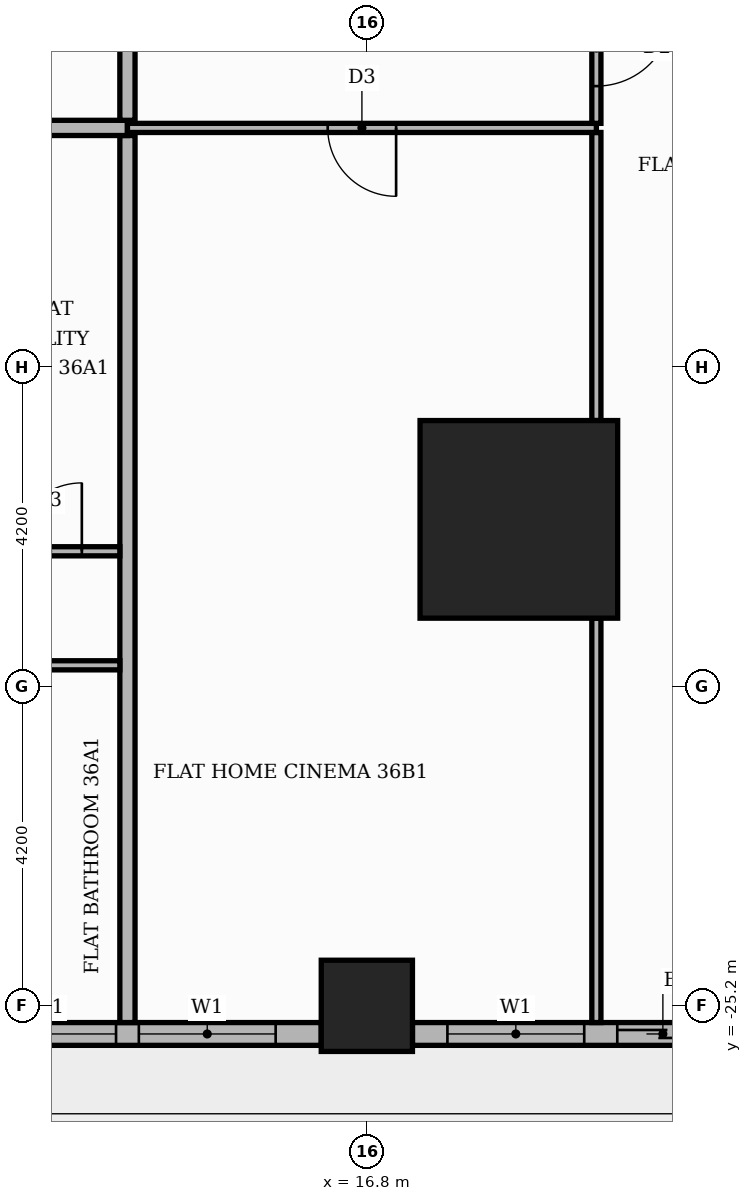
"""IFC4 building model, lengths in metres.
Left out: names, types, materials, properties, quantities, classifications, styles, units other than length and angle.
Written with IfcOpenShell. Run it as: python <this file> out.ifc"""

import sys

from ifc_helpers import new_model, si_unit, direction, frame, frame_2d, origin, origin_2d, place, context, subcontext, project, spatial, rectangle, extrude, element, fill, save


model = new_model("IFC4")
c1 = context("Model", 3, precision=1e-05, world=origin(), true_north=direction((0.0, 1.0)))
c2 = subcontext(c1, "Body", "Model", "MODEL_VIEW")
j1 = project(units=[si_unit("LENGTHUNIT", "METRE"), si_unit("PLANEANGLEUNIT", "RADIAN")], contexts=[c1])
p1 = place(None, origin())
s1 = spatial("IfcSite", under=j1, at=p1, CompositionType="ELEMENT")
p2 = place(p1, origin())
s2 = spatial("IfcBuilding", under=s1, at=p2, CompositionType="ELEMENT")
p3 = place(p2, frame((0.0, 0.0, 153.3)))
s3 = spatial("IfcBuildingStorey", under=s2, at=p3, CompositionType="ELEMENT", Elevation=153.3)
p4 = place(p3, frame((18.8, -18.8, 0.0), z_axis=(0.0, 0.0, 1.0), x_axis=(1.0, 0.0, 0.0)))
e1 = element("IfcColumn", 1, at=p4, inside=s3, PredefinedType="COLUMN", context=c2, shape_type="SweptSolid", body=[
    extrude(rectangle(XDim=2.6, YDim=2.6, at=origin_2d()), origin(), (0.0, 0.0, 1.0), 3.9),
])
p5 = place(p3, frame((16.8, -25.2, 0.0), z_axis=(0.0, 0.0, 1.0), x_axis=(1.0, 0.0, 0.0)))
e2 = element("IfcColumn", 2, at=p5, inside=s3, PredefinedType="COLUMN", context=c2, shape_type="SweptSolid", body=[
    extrude(rectangle(XDim=1.2, YDim=1.2, at=origin_2d()), origin(), (0.0, 0.0, 1.0), 3.9),
])
p6 = place(p3, frame((9.0, -25.57, 0.0), z_axis=(0.0, 0.0, 1.0), x_axis=(1.0, 0.0, 0.0)))
e3 = element("IfcWall", 3, at=p6, inside=s3, PredefinedType="STANDARD", context=c2, shape_type="SweptSolid", body=[
    extrude(rectangle(XDim=7.2, YDim=0.3, at=frame_2d((3.6, 0.0))), origin(), (0.0, 0.0, 1.0), 3.48),
])
p7 = place(p6, frame((0.6, 0.0, 0.9)))
e4 = element("IfcOpeningElement", 4, at=p7, cuts=e3, PredefinedType="OPENING", context=c2, shape_type="SweptSolid", body=[
    extrude(rectangle(XDim=1.8, YDim=2.1, at=frame_2d((0.9, 1.05))), frame((0.0, 0.16, 0.0), z_axis=(0.0, -1.0, 0.0), x_axis=(1.0, 0.0, 0.0)), (0.0, 0.0, 1.0), 0.32),
])
p8 = place(p6, frame((2.7, 0.0, 0.9)))
e5 = element("IfcOpeningElement", 5, at=p8, cuts=e3, PredefinedType="OPENING", context=c2, shape_type="SweptSolid", body=[
    extrude(rectangle(XDim=1.8, YDim=2.1, at=frame_2d((0.9, 1.05))), frame((0.0, 0.16, 0.0), z_axis=(0.0, -1.0, 0.0), x_axis=(1.0, 0.0, 0.0)), (0.0, 0.0, 1.0), 0.32),
])
p9 = place(p6, frame((4.8, 0.0, 0.9)))
e6 = element("IfcOpeningElement", 6, at=p9, cuts=e3, PredefinedType="OPENING", context=c2, shape_type="SweptSolid", body=[
    extrude(rectangle(XDim=1.8, YDim=2.1, at=frame_2d((0.9, 1.05))), frame((0.0, 0.16, 0.0), z_axis=(0.0, -1.0, 0.0), x_axis=(1.0, 0.0, 0.0)), (0.0, 0.0, 1.0), 0.32),
])
p10 = place(p3, frame((17.4, -25.57, 0.0), z_axis=(0.0, 0.0, 1.0), x_axis=(1.0, 0.0, 0.0)))
e7 = element("IfcWall", 7, at=p10, inside=s3, PredefinedType="STANDARD", context=c2, shape_type="SweptSolid", body=[
    extrude(rectangle(XDim=4.32, YDim=0.3, at=frame_2d((2.16, 0.0))), origin(), (0.0, 0.0, 1.0), 3.48),
])
p11 = place(p10, frame((2.695, 0.0, 0.0)))
e8 = element("IfcOpeningElement", 8, at=p11, cuts=e7, PredefinedType="OPENING", context=c2, shape_type="SweptSolid", body=[
    extrude(rectangle(XDim=1.2, YDim=2.4, at=frame_2d((0.6, 1.2))), frame((0.0, 0.16, 0.0), z_axis=(0.0, -1.0, 0.0), x_axis=(1.0, 0.0, 0.0)), (0.0, 0.0, 1.0), 0.32),
])
p12 = place(p10, frame((0.46, 0.0, 0.9)))
e9 = element("IfcOpeningElement", 9, at=p12, cuts=e7, PredefinedType="OPENING", context=c2, shape_type="SweptSolid", body=[
    extrude(rectangle(XDim=1.8, YDim=2.1, at=frame_2d((0.9, 1.05))), frame((0.0, 0.16, 0.0), z_axis=(0.0, -1.0, 0.0), x_axis=(1.0, 0.0, 0.0)), (0.0, 0.0, 1.0), 0.32),
])
p13 = place(p3, frame((13.65, -25.42, 0.0), z_axis=(0.0, 0.0, 1.0), x_axis=(0.0, 1.0, 0.0)))
e10 = element("IfcWall", 10, at=p13, inside=s3, PredefinedType="PARTITIONING", context=c2, shape_type="SweptSolid", body=[
    extrude(rectangle(XDim=11.67, YDim=0.2, at=frame_2d((5.835, 0.0))), origin(), (0.0, 0.0, 1.0), 3.48),
])
p14 = place(p3, frame((19.82, -25.42, 0.0), z_axis=(0.0, 0.0, 1.0), x_axis=(0.0, 1.0, 0.0)))
e11 = element("IfcWall", 11, at=p14, inside=s3, PredefinedType="PARTITIONING", context=c2, shape_type="SweptSolid", body=[
    extrude(rectangle(XDim=5.32, YDim=0.12, at=frame_2d((2.66, 0.0))), origin(), (0.0, 0.0, 1.0), 3.48),
])
p15 = place(p3, frame((-25.42, -20.72, 0.0), z_axis=(0.0, 0.0, 1.0), x_axis=(1.0, 0.0, 0.0)))
e12 = element("IfcWall", 12, at=p15, inside=s3, PredefinedType="PARTITIONING", context=c2, shape_type="SweptSolid", body=[
    extrude(rectangle(XDim=38.97, YDim=0.12, at=frame_2d((19.485, 0.0))), origin(), (0.0, 0.0, 1.0), 3.48),
])
p16 = place(p15, frame((12.32, 0.0, 0.0)))
e13 = element("IfcOpeningElement", 13, at=p16, cuts=e12, PredefinedType="OPENING", context=c2, shape_type="SweptSolid", body=[
    extrude(rectangle(XDim=1.0, YDim=2.1, at=frame_2d((0.5, 1.05))), frame((0.0, 0.07, 0.0), z_axis=(0.0, -1.0, 0.0), x_axis=(1.0, 0.0, 0.0)), (0.0, 0.0, 1.0), 0.14),
])
p17 = place(p15, frame((17.57, 0.0, 0.0)))
e14 = element("IfcOpeningElement", 14, at=p17, cuts=e12, PredefinedType="OPENING", context=c2, shape_type="SweptSolid", body=[
    extrude(rectangle(XDim=1.0, YDim=2.1, at=frame_2d((0.5, 1.05))), frame((0.0, 0.07, 0.0), z_axis=(0.0, -1.0, 0.0), x_axis=(1.0, 0.0, 0.0)), (0.0, 0.0, 1.0), 0.14),
])
p18 = place(p15, frame((24.97, 0.0, 0.0)))
e15 = element("IfcOpeningElement", 15, at=p18, cuts=e12, PredefinedType="OPENING", context=c2, shape_type="SweptSolid", body=[
    extrude(rectangle(XDim=0.9, YDim=2.1, at=frame_2d((0.45, 1.05))), frame((0.0, 0.07, 0.0), z_axis=(0.0, -1.0, 0.0), x_axis=(1.0, 0.0, 0.0)), (0.0, 0.0, 1.0), 0.14),
])
p19 = place(p15, frame((34.42, 0.0, 0.0)))
e16 = element("IfcOpeningElement", 16, at=p19, cuts=e12, PredefinedType="OPENING", context=c2, shape_type="SweptSolid", body=[
    extrude(rectangle(XDim=0.9, YDim=2.1, at=frame_2d((0.45, 1.05))), frame((0.0, 0.07, 0.0), z_axis=(0.0, -1.0, 0.0), x_axis=(1.0, 0.0, 0.0)), (0.0, 0.0, 1.0), 0.14),
])
p20 = place(p3, frame((-7.35, -19.22, 0.0), z_axis=(0.0, 0.0, 1.0), x_axis=(1.0, 0.0, 0.0)))
e17 = element("IfcWall", 17, at=p20, inside=s3, PredefinedType="PARTITIONING", context=c2, shape_type="SweptSolid", body=[
    extrude(rectangle(XDim=20.9, YDim=0.12, at=frame_2d((10.45, 0.0))), origin(), (0.0, 0.0, 1.0), 3.48),
])
p21 = place(p20, frame((2.7, 0.0, 0.0)))
e18 = element("IfcOpeningElement", 18, at=p21, cuts=e17, PredefinedType="OPENING", context=c2, shape_type="SweptSolid", body=[
    extrude(rectangle(XDim=0.9, YDim=2.1, at=frame_2d((0.45, 1.05))), frame((0.0, 0.07, 0.0), z_axis=(0.0, -1.0, 0.0), x_axis=(1.0, 0.0, 0.0)), (0.0, 0.0, 1.0), 0.14),
])
p22 = place(p20, frame((7.95, 0.0, 0.0)))
e19 = element("IfcOpeningElement", 19, at=p22, cuts=e17, PredefinedType="OPENING", context=c2, shape_type="SweptSolid", body=[
    extrude(rectangle(XDim=0.9, YDim=2.1, at=frame_2d((0.45, 1.05))), frame((0.0, 0.07, 0.0), z_axis=(0.0, -1.0, 0.0), x_axis=(1.0, 0.0, 0.0)), (0.0, 0.0, 1.0), 0.14),
])
p23 = place(p20, frame((11.1, 0.0, 0.0)))
e20 = element("IfcOpeningElement", 20, at=p23, cuts=e17, PredefinedType="OPENING", context=c2, shape_type="SweptSolid", body=[
    extrude(rectangle(XDim=0.9, YDim=2.1, at=frame_2d((0.45, 1.05))), frame((0.0, 0.07, 0.0), z_axis=(0.0, -1.0, 0.0), x_axis=(1.0, 0.0, 0.0)), (0.0, 0.0, 1.0), 0.14),
])
p24 = place(p20, frame((13.95, 0.0, 0.0)))
e21 = element("IfcOpeningElement", 21, at=p24, cuts=e17, PredefinedType="OPENING", context=c2, shape_type="SweptSolid", body=[
    extrude(rectangle(XDim=0.9, YDim=2.1, at=frame_2d((0.45, 1.05))), frame((0.0, 0.07, 0.0), z_axis=(0.0, -1.0, 0.0), x_axis=(1.0, 0.0, 0.0)), (0.0, 0.0, 1.0), 0.14),
])
p25 = place(p20, frame((17.1, 0.0, 0.0)))
e22 = element("IfcOpeningElement", 22, at=p25, cuts=e17, PredefinedType="OPENING", context=c2, shape_type="SweptSolid", body=[
    extrude(rectangle(XDim=0.9, YDim=2.1, at=frame_2d((0.45, 1.05))), frame((0.0, 0.07, 0.0), z_axis=(0.0, -1.0, 0.0), x_axis=(1.0, 0.0, 0.0)), (0.0, 0.0, 1.0), 0.14),
])
p26 = place(p20, frame((19.5, 0.0, 0.0)))
e23 = element("IfcOpeningElement", 23, at=p26, cuts=e17, PredefinedType="OPENING", context=c2, shape_type="SweptSolid", body=[
    extrude(rectangle(XDim=0.9, YDim=2.1, at=frame_2d((0.45, 1.05))), frame((0.0, 0.07, 0.0), z_axis=(0.0, -1.0, 0.0), x_axis=(1.0, 0.0, 0.0)), (0.0, 0.0, 1.0), 0.14),
])
p27 = place(p3, frame((19.82, -17.5, 0.0), z_axis=(0.0, 0.0, 1.0), x_axis=(0.0, 1.0, 0.0)))
e24 = element("IfcWall", 24, at=p27, inside=s3, PredefinedType="PARTITIONING", context=c2, shape_type="SweptSolid", body=[
    extrude(rectangle(XDim=3.79, YDim=0.12, at=frame_2d((1.895, 0.0))), origin(), (0.0, 0.0, 1.0), 3.48),
])
p28 = place(p3, frame((-25.42, -13.65, 0.0), z_axis=(0.0, 0.0, 1.0), x_axis=(1.0, 0.0, 0.0)))
e25 = element("IfcWall", 25, at=p28, inside=s3, PredefinedType="PARTITIONING", context=c2, shape_type="SweptSolid", body=[
    extrude(rectangle(XDim=39.07, YDim=0.2, at=frame_2d((19.535, 0.0))), origin(), (0.0, 0.0, 1.0), 3.48),
])
p29 = place(p28, frame((14.37, 0.0, 0.0)))
e26 = element("IfcOpeningElement", 26, at=p29, cuts=e25, PredefinedType="OPENING", context=c2, shape_type="SweptSolid", body=[
    extrude(rectangle(XDim=1.1, YDim=2.4, at=frame_2d((0.55, 1.2))), frame((0.0, 0.11, 0.0), z_axis=(0.0, -1.0, 0.0), x_axis=(1.0, 0.0, 0.0)), (0.0, 0.0, 1.0), 0.22),
])
p30 = place(p3, frame((13.65, -13.65, 0.0), z_axis=(0.0, 0.0, 1.0), x_axis=(1.0, 0.0, 0.0)))
e27 = element("IfcWall", 27, at=p30, inside=s3, PredefinedType="PARTITIONING", context=c2, shape_type="SweptSolid", body=[
    extrude(rectangle(XDim=6.17, YDim=0.12, at=frame_2d((3.085, 0.0))), origin(), (0.0, 0.0, 1.0), 3.48),
])
p31 = place(p30, frame((2.635, 0.0, 0.0)))
e28 = element("IfcOpeningElement", 28, at=p31, cuts=e27, PredefinedType="OPENING", context=c2, shape_type="SweptSolid", body=[
    extrude(rectangle(XDim=0.9, YDim=2.1, at=frame_2d((0.45, 1.05))), frame((0.0, 0.07, 0.0), z_axis=(0.0, -1.0, 0.0), x_axis=(1.0, 0.0, 0.0)), (0.0, 0.0, 1.0), 0.14),
])
p32 = place(p3, frame((19.82, -13.59, 0.0), z_axis=(0.0, 0.0, 1.0), x_axis=(0.0, 1.0, 0.0)))
e29 = element("IfcWall", 29, at=p32, inside=s3, PredefinedType="PARTITIONING", context=c2, shape_type="SweptSolid", body=[
    extrude(rectangle(XDim=1.98, YDim=0.12, at=frame_2d((0.99, 0.0))), origin(), (0.0, 0.0, 1.0), 3.48),
])
p33 = place(p32, frame((0.49, 0.0, 0.0)))
e30 = element("IfcOpeningElement", 30, at=p33, cuts=e29, PredefinedType="OPENING", context=c2, shape_type="SweptSolid", body=[
    extrude(rectangle(XDim=1.0, YDim=2.1, at=frame_2d((0.5, 1.05))), frame((0.0, 0.07, 0.0), z_axis=(0.0, -1.0, 0.0), x_axis=(1.0, 0.0, 0.0)), (0.0, 0.0, 1.0), 0.14),
])
p34 = place(p3, frame((13.65, -13.55, 0.0), z_axis=(0.0, 0.0, 1.0), x_axis=(0.0, 1.0, 0.0)))
e31 = element("IfcWall", 31, at=p34, inside=s3, PredefinedType="PARTITIONING", context=c2, shape_type="SweptSolid", body=[
    extrude(rectangle(XDim=2.45, YDim=0.2, at=frame_2d((1.225, 0.0))), origin(), (0.0, 0.0, 1.0), 3.48),
])
p35 = place(p8, origin())
e32 = element("IfcWindow", 32, at=p35, inside=s3, PartitioningType="SINGLE_PANEL", PredefinedType="WINDOW", context=c2, shape_type="SweptSolid", body=[
    extrude(rectangle(XDim=1.8, YDim=2.1, at=frame_2d((0.9, 1.05))), frame((0.0, 0.03, 0.0), z_axis=(0.0, -1.0, 0.0), x_axis=(1.0, 0.0, 0.0)), (0.0, 0.0, 1.0), 0.06),
])
fill(e5, e32)
p36 = place(p9, origin())
e33 = element("IfcWindow", 33, at=p36, inside=s3, PartitioningType="SINGLE_PANEL", PredefinedType="WINDOW", context=c2, shape_type="SweptSolid", body=[
    extrude(rectangle(XDim=1.8, YDim=2.1, at=frame_2d((0.9, 1.05))), frame((0.0, 0.03, 0.0), z_axis=(0.0, -1.0, 0.0), x_axis=(1.0, 0.0, 0.0)), (0.0, 0.0, 1.0), 0.06),
])
fill(e6, e33)
p37 = place(p11, origin())
e34 = element("IfcDoor", 34, at=p37, inside=s3, OperationType="SLIDING_TO_LEFT", PredefinedType="DOOR", context=c2, shape_type="SweptSolid", body=[
    extrude(rectangle(XDim=1.2, YDim=2.4, at=frame_2d((0.6, 1.2))), frame((0.0, 0.025, 0.0), z_axis=(0.0, -1.0, 0.0), x_axis=(1.0, 0.0, 0.0)), (0.0, 0.0, 1.0), 0.05),
])
fill(e8, e34)
p38 = place(p12, origin())
e35 = element("IfcWindow", 35, at=p38, inside=s3, PartitioningType="SINGLE_PANEL", PredefinedType="WINDOW", context=c2, shape_type="SweptSolid", body=[
    extrude(rectangle(XDim=1.8, YDim=2.1, at=frame_2d((0.9, 1.05))), frame((0.0, 0.03, 0.0), z_axis=(0.0, -1.0, 0.0), x_axis=(1.0, 0.0, 0.0)), (0.0, 0.0, 1.0), 0.06),
])
fill(e9, e35)
p39 = place(p26, origin())
e36 = element("IfcDoor", 36, at=p39, inside=s3, OperationType="SINGLE_SWING_RIGHT", PredefinedType="DOOR", context=c2, shape_type="SweptSolid", body=[
    extrude(rectangle(XDim=0.9, YDim=2.1, at=frame_2d((0.45, 1.05))), frame((0.0, 0.025, 0.0), z_axis=(0.0, -1.0, 0.0), x_axis=(1.0, 0.0, 0.0)), (0.0, 0.0, 1.0), 0.05),
])
fill(e23, e36)
p40 = place(p31, frame((0.9, 0.0, 0.0), z_axis=(0.0, 0.0, 1.0), x_axis=(-1.0, 0.0, 0.0)))
e37 = element("IfcDoor", 37, at=p40, inside=s3, OperationType="SINGLE_SWING_RIGHT", PredefinedType="DOOR", context=c2, shape_type="SweptSolid", body=[
    extrude(rectangle(XDim=0.9, YDim=2.1, at=frame_2d((0.45, 1.05))), frame((0.0, 0.025, 0.0), z_axis=(0.0, -1.0, 0.0), x_axis=(1.0, 0.0, 0.0)), (0.0, 0.0, 1.0), 0.05),
])
fill(e28, e37)
p41 = place(p33, frame((1.0, 0.0, 0.0), z_axis=(0.0, 0.0, 1.0), x_axis=(-1.0, 0.0, 0.0)))
e38 = element("IfcDoor", 38, at=p41, inside=s3, OperationType="SINGLE_SWING_RIGHT", PredefinedType="DOOR", context=c2, shape_type="SweptSolid", body=[
    extrude(rectangle(XDim=1.0, YDim=2.1, at=frame_2d((0.5, 1.05))), frame((0.0, 0.025, 0.0), z_axis=(0.0, -1.0, 0.0), x_axis=(1.0, 0.0, 0.0)), (0.0, 0.0, 1.0), 0.05),
])
fill(e30, e38)
save(model, sys.argv[1])
